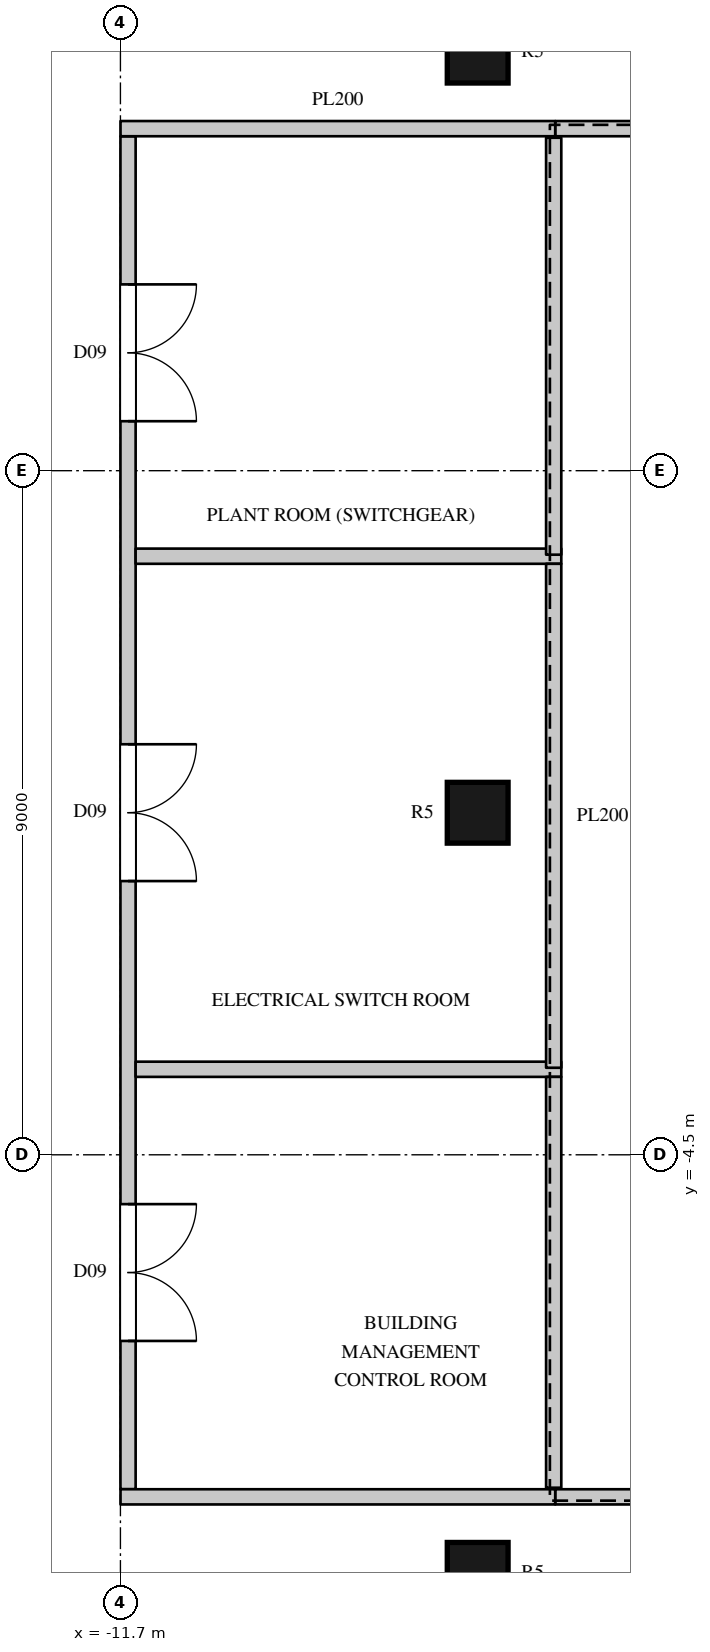
"""IFC4 building model, lengths in metres.
Left out: names, types, materials, properties, quantities, classifications, styles, units other than length and angle.
Written with IfcOpenShell. Run it as: python <this file> out.ifc"""

import sys

from ifc_helpers import new_model, si_unit, direction, frame, frame_2d, origin, origin_2d, place, context, subcontext, project, spatial, rectangle, circle, extrude, element, fill, save


model = new_model("IFC4")
c1 = context("Model", 3, precision=1e-05, world=origin(), true_north=direction((0.0, 1.0)))
c2 = subcontext(c1, "Body", "Model", "MODEL_VIEW")
j1 = project(units=[si_unit("LENGTHUNIT", "METRE"), si_unit("PLANEANGLEUNIT", "RADIAN")], contexts=[c1])
p1 = place(None, origin())
s1 = spatial("IfcSite", under=j1, at=p1, CompositionType="ELEMENT")
p2 = place(p1, origin())
s2 = spatial("IfcBuilding", under=s1, at=p2, CompositionType="ELEMENT")
p3 = place(p2, frame((0.0, 0.0, 335.0)))
s3 = spatial("IfcBuildingStorey", under=s2, at=p3, CompositionType="ELEMENT", Elevation=335.0)
for number, where, z_axis, x_axis in (
    (1, (-7.0, -10.0, 0.0), (0.0, 0.0, 1.0), (1.0, 0.0, 0.0)),
    (2, (-7.0, 0.0, 0.0), (0.0, 0.0, 1.0), (1.0, 0.0, 0.0)),
    (3, (-7.0, 10.0, 0.0), (0.0, 0.0, 1.0), (1.0, 0.0, 0.0)),
):
    element("IfcColumn", number, at=place(p3, frame(where, z_axis=z_axis, x_axis=x_axis)), inside=s3, PredefinedType="COLUMN", context=c2, shape_type="SweptSolid", body=[
        extrude(circle(Radius=0.4, at=origin_2d()), origin(), (0.0, 0.0, 1.0), 4.0),
    ])
for number, where, z_axis, x_axis in (
    (4, (-5.98, -9.0, 0.0), (0.0, 0.0, 1.0), (1.0, 0.0, 0.0)),
    (5, (-5.98, 9.0, 0.0), (0.0, 0.0, 1.0), (1.0, 0.0, 0.0)),
):
    element("IfcWall", number, at=place(p3, frame(where, z_axis=z_axis, x_axis=x_axis)), inside=s3, PredefinedType="PARTITIONING", context=c2, shape_type="SweptSolid", body=[
        extrude(rectangle(XDim=13.96, YDim=0.2, at=frame_2d((6.98, 0.0))), origin(), (0.0, 0.0, 1.0), 3.598),
    ])
p4 = place(p3, frame((-11.6, -8.899, 0.0), z_axis=(0.0, 0.0, 1.0), x_axis=(0.0, 1.0, 0.0)))
e6 = element("IfcWall", 6, at=p4, inside=s3, PredefinedType="PARTITIONING", context=c2, shape_type="SweptSolid", body=[
    extrude(rectangle(XDim=17.798, YDim=0.2, at=frame_2d((8.899, 0.0))), origin(), (0.0, 0.0, 1.0), 3.598),
])
p5 = place(p4, frame((1.95, 0.0, 0.0)))
e7 = element("IfcOpeningElement", 7, at=p5, cuts=e6, PredefinedType="OPENING", context=c2, shape_type="SweptSolid", body=[
    extrude(rectangle(XDim=1.8, YDim=2.4, at=frame_2d((0.9, 1.2))), frame((0.0, 0.11, 0.0), z_axis=(0.0, -1.0, 0.0), x_axis=(1.0, 0.0, 0.0)), (0.0, 0.0, 1.0), 0.22),
])
p6 = place(p4, frame((8.0, 0.0, 0.0)))
e8 = element("IfcOpeningElement", 8, at=p6, cuts=e6, PredefinedType="OPENING", context=c2, shape_type="SweptSolid", body=[
    extrude(rectangle(XDim=1.8, YDim=2.4, at=frame_2d((0.9, 1.2))), frame((0.0, 0.11, 0.0), z_axis=(0.0, -1.0, 0.0), x_axis=(1.0, 0.0, 0.0)), (0.0, 0.0, 1.0), 0.22),
])
p7 = place(p4, frame((14.05, 0.0, 0.0)))
e9 = element("IfcOpeningElement", 9, at=p7, cuts=e6, PredefinedType="OPENING", context=c2, shape_type="SweptSolid", body=[
    extrude(rectangle(XDim=1.8, YDim=2.4, at=frame_2d((0.9, 1.2))), frame((0.0, 0.11, 0.0), z_axis=(0.0, -1.0, 0.0), x_axis=(1.0, 0.0, 0.0)), (0.0, 0.0, 1.0), 0.22),
])
for number, where, z_axis, x_axis in (
    (10, (-11.5, -3.375, 0.0), (0.0, 0.0, 1.0), (1.0, 0.0, 0.0)),
    (11, (-11.5, 3.375, 0.0), (0.0, 0.0, 1.0), (1.0, 0.0, 0.0)),
):
    element("IfcWall", number, at=place(p3, frame(where, z_axis=z_axis, x_axis=x_axis)), inside=s3, PredefinedType="PARTITIONING", context=c2, shape_type="SweptSolid", body=[
        extrude(rectangle(XDim=5.6, YDim=0.2, at=frame_2d((2.8, 0.0))), origin(), (0.0, 0.0, 1.0), 3.598),
    ])
for number, where, z_axis, x_axis in (
    (12, (-11.699, -9.0, 0.0), (0.0, 0.0, 1.0), (1.0, 0.0, 0.0)),
    (13, (-11.699, 9.0, 0.0), (0.0, 0.0, 1.0), (1.0, 0.0, 0.0)),
):
    element("IfcWall", number, at=place(p3, frame(where, z_axis=z_axis, x_axis=x_axis)), inside=s3, PredefinedType="PARTITIONING", context=c2, shape_type="SweptSolid", body=[
        extrude(rectangle(XDim=5.719, YDim=0.2, at=frame_2d((2.859, 0.0))), origin(), (0.0, 0.0, 1.0), 3.598),
    ])
p8 = place(p3, frame((-6.0, -8.88, 0.0), z_axis=(0.0, 0.0, 1.0), x_axis=(0.0, 1.0, 0.0)))
e14 = element("IfcWall", 14, at=p8, inside=s3, PredefinedType="PARTITIONING", context=c2, shape_type="SweptSolid", body=[
    extrude(rectangle(XDim=5.405, YDim=0.2, at=frame_2d((2.702, 0.0))), origin(), (0.0, 0.0, 1.0), 3.598),
])
p9 = place(p3, frame((-6.0, -3.355, 0.0), z_axis=(0.0, 0.0, 1.0), x_axis=(0.0, 1.0, 0.0)))
e15 = element("IfcWall", 15, at=p9, inside=s3, PredefinedType="PARTITIONING", context=c2, shape_type="SweptSolid", body=[
    extrude(rectangle(XDim=6.63, YDim=0.2, at=frame_2d((3.315, 0.0))), origin(), (0.0, 0.0, 1.0), 3.598),
])
p10 = place(p3, frame((-6.0, 3.395, 0.0), z_axis=(0.0, 0.0, 1.0), x_axis=(0.0, 1.0, 0.0)))
e16 = element("IfcWall", 16, at=p10, inside=s3, PredefinedType="PARTITIONING", context=c2, shape_type="SweptSolid", body=[
    extrude(rectangle(XDim=5.485, YDim=0.2, at=frame_2d((2.742, 0.0))), origin(), (0.0, 0.0, 1.0), 3.598),
])
p11 = place(p5, origin())
e17 = element("IfcDoor", 17, at=p11, inside=s3, OperationType="DOUBLE_DOOR_SINGLE_SWING", PredefinedType="DOOR", context=c2, shape_type="SweptSolid", body=[
    extrude(rectangle(XDim=1.8, YDim=2.4, at=frame_2d((0.9, 1.2))), frame((0.0, 0.025, 0.0), z_axis=(0.0, -1.0, 0.0), x_axis=(1.0, 0.0, 0.0)), (0.0, 0.0, 1.0), 0.05),
])
fill(e7, e17)
p12 = place(p6, origin())
e18 = element("IfcDoor", 18, at=p12, inside=s3, OperationType="DOUBLE_DOOR_SINGLE_SWING", PredefinedType="DOOR", context=c2, shape_type="SweptSolid", body=[
    extrude(rectangle(XDim=1.8, YDim=2.4, at=frame_2d((0.9, 1.2))), frame((0.0, 0.025, 0.0), z_axis=(0.0, -1.0, 0.0), x_axis=(1.0, 0.0, 0.0)), (0.0, 0.0, 1.0), 0.05),
])
fill(e8, e18)
p13 = place(p7, origin())
e19 = element("IfcDoor", 19, at=p13, inside=s3, OperationType="DOUBLE_DOOR_SINGLE_SWING", PredefinedType="DOOR", context=c2, shape_type="SweptSolid", body=[
    extrude(rectangle(XDim=1.8, YDim=2.4, at=frame_2d((0.9, 1.2))), frame((0.0, 0.025, 0.0), z_axis=(0.0, -1.0, 0.0), x_axis=(1.0, 0.0, 0.0)), (0.0, 0.0, 1.0), 0.05),
])
fill(e9, e19)
save(model, sys.argv[1])
